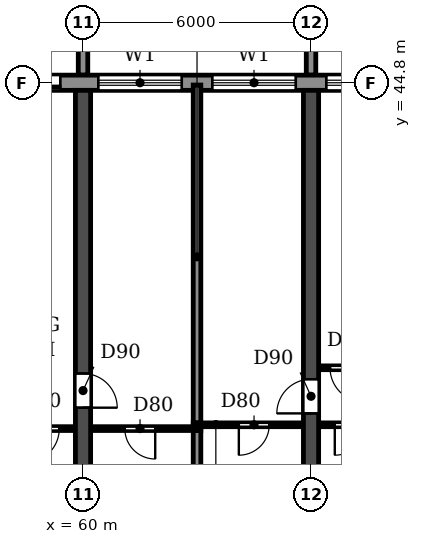
"""IFC4 building model, lengths in metres.
Left out: names, types, materials, properties, quantities, classifications, styles, units other than length and angle.
Written with IfcOpenShell. Run it as: python <this file> out.ifc"""

import sys

from ifc_helpers import new_model, si_unit, direction, frame, frame_2d, origin, place, context, subcontext, project, spatial, polyline, rectangle, outline, extrude, source, transform, mapped, element, fill, save


model = new_model("IFC4")
c1 = context("Model", 3, precision=1e-05, world=origin(), true_north=direction((0.0, 1.0)))
c2 = subcontext(c1, "Body", "Model", "MODEL_VIEW")
j1 = project(units=[si_unit("LENGTHUNIT", "METRE"), si_unit("PLANEANGLEUNIT", "RADIAN")], contexts=[c1])
p1 = place(None, origin())
s1 = spatial("IfcSite", under=j1, at=p1, CompositionType="ELEMENT")
p2 = place(p1, origin())
s2 = spatial("IfcBuilding", under=s1, at=p2, CompositionType="ELEMENT")
p3 = place(p2, frame((0.0, 0.0, 43.2)))
s3 = spatial("IfcBuildingStorey", under=s2, at=p3, CompositionType="ELEMENT", Elevation=43.2)
p4 = place(p3, frame((60.0, 30.55, 0.0), z_axis=(0.0, 0.0, 1.0), x_axis=(0.0, 1.0, 0.0)))
e1 = element("IfcWall", 1, at=p4, inside=s3, PredefinedType="SHEAR", context=c2, shape_type="SweptSolid", body=[
    extrude(rectangle(XDim=14.05, YDim=0.4, at=frame_2d((7.025, 0.0))), origin(), (0.0, 0.0, 1.0), 3.05),
])
p5 = place(p4, frame((5.7, 0.0, 0.0)))
e2 = element("IfcOpeningElement", 2, at=p5, cuts=e1, PredefinedType="OPENING", context=c2, shape_type="SweptSolid", body=[
    extrude(rectangle(XDim=0.9, YDim=2.1, at=frame_2d((0.45, 1.05))), frame((0.0, 0.21, 0.0), z_axis=(0.0, -1.0, 0.0), x_axis=(1.0, 0.0, 0.0)), (0.0, 0.0, 1.0), 0.42),
])
p6 = place(p3, frame((66.0, 30.55, 0.0), z_axis=(0.0, 0.0, 1.0), x_axis=(0.0, 1.0, 0.0)))
e3 = element("IfcWall", 3, at=p6, inside=s3, PredefinedType="SHEAR", context=c2, shape_type="SweptSolid", body=[
    extrude(rectangle(XDim=14.05, YDim=0.4, at=frame_2d((7.025, 0.0))), origin(), (0.0, 0.0, 1.0), 3.05),
])
p7 = place(p6, frame((5.55, 0.0, 0.0)))
e4 = element("IfcOpeningElement", 4, at=p7, cuts=e3, PredefinedType="OPENING", context=c2, shape_type="SweptSolid", body=[
    extrude(rectangle(XDim=0.9, YDim=2.1, at=frame_2d((0.45, 1.05))), frame((0.0, 0.21, 0.0), z_axis=(0.0, -1.0, 0.0), x_axis=(1.0, 0.0, 0.0)), (0.0, 0.0, 1.0), 0.42),
])
p8 = place(p3, frame((97.317, 44.8, 0.0), z_axis=(0.0, 0.0, 1.0), x_axis=(-1.0, 0.0, 0.0)))
e5 = element("IfcWall", 5, at=p8, inside=s3, PredefinedType="STANDARD", context=c2, shape_type="SweptSolid", body=[
    extrude(rectangle(XDim=92.634, YDim=0.4, at=frame_2d((46.317, 0.0))), origin(), (0.0, 0.0, 1.0), 3.05),
])
p9 = place(p8, frame((88.917, 0.0, 0.0)))
e6 = element("IfcOpeningElement", 6, at=p9, cuts=e5, PredefinedType="OPENING", context=c2, shape_type="SweptSolid", body=[
    extrude(rectangle(XDim=1.8, YDim=2.4, at=frame_2d((0.9, 1.2))), frame((0.0, 0.21, 0.0), z_axis=(0.0, -1.0, 0.0), x_axis=(1.0, 0.0, 0.0)), (0.0, 0.0, 1.0), 0.42),
])
p10 = place(p8, frame((85.717, 0.0, 0.9)))
e7 = element("IfcOpeningElement", 7, at=p10, cuts=e5, PredefinedType="OPENING", context=c2, shape_type="SweptSolid", body=[
    extrude(rectangle(XDim=2.2, YDim=1.5, at=frame_2d((1.1, 0.75))), frame((0.0, 0.21, 0.0), z_axis=(0.0, -1.0, 0.0), x_axis=(1.0, 0.0, 0.0)), (0.0, 0.0, 1.0), 0.42),
])
p11 = place(p8, frame((82.717, 0.0, 0.9)))
e8 = element("IfcOpeningElement", 8, at=p11, cuts=e5, PredefinedType="OPENING", context=c2, shape_type="SweptSolid", body=[
    extrude(rectangle(XDim=2.2, YDim=1.5, at=frame_2d((1.1, 0.75))), frame((0.0, 0.21, 0.0), z_axis=(0.0, -1.0, 0.0), x_axis=(1.0, 0.0, 0.0)), (0.0, 0.0, 1.0), 0.42),
])
p12 = place(p8, frame((79.717, 0.0, 0.9)))
e9 = element("IfcOpeningElement", 9, at=p12, cuts=e5, PredefinedType="OPENING", context=c2, shape_type="SweptSolid", body=[
    extrude(rectangle(XDim=2.2, YDim=1.5, at=frame_2d((1.1, 0.75))), frame((0.0, 0.21, 0.0), z_axis=(0.0, -1.0, 0.0), x_axis=(1.0, 0.0, 0.0)), (0.0, 0.0, 1.0), 0.42),
])
p13 = place(p8, frame((76.717, 0.0, 0.9)))
e10 = element("IfcOpeningElement", 10, at=p13, cuts=e5, PredefinedType="OPENING", context=c2, shape_type="SweptSolid", body=[
    extrude(rectangle(XDim=2.2, YDim=1.5, at=frame_2d((1.1, 0.75))), frame((0.0, 0.21, 0.0), z_axis=(0.0, -1.0, 0.0), x_axis=(1.0, 0.0, 0.0)), (0.0, 0.0, 1.0), 0.42),
])
p14 = place(p8, frame((73.917, 0.0, 0.0)))
e11 = element("IfcOpeningElement", 11, at=p14, cuts=e5, PredefinedType="OPENING", context=c2, shape_type="SweptSolid", body=[
    extrude(rectangle(XDim=1.8, YDim=2.4, at=frame_2d((0.9, 1.2))), frame((0.0, 0.21, 0.0), z_axis=(0.0, -1.0, 0.0), x_axis=(1.0, 0.0, 0.0)), (0.0, 0.0, 1.0), 0.42),
])
p15 = place(p8, frame((70.717, 0.0, 0.9)))
e12 = element("IfcOpeningElement", 12, at=p15, cuts=e5, PredefinedType="OPENING", context=c2, shape_type="SweptSolid", body=[
    extrude(rectangle(XDim=2.2, YDim=1.5, at=frame_2d((1.1, 0.75))), frame((0.0, 0.21, 0.0), z_axis=(0.0, -1.0, 0.0), x_axis=(1.0, 0.0, 0.0)), (0.0, 0.0, 1.0), 0.42),
])
p16 = place(p8, frame((67.717, 0.0, 0.9)))
e13 = element("IfcOpeningElement", 13, at=p16, cuts=e5, PredefinedType="OPENING", context=c2, shape_type="SweptSolid", body=[
    extrude(rectangle(XDim=2.2, YDim=1.5, at=frame_2d((1.1, 0.75))), frame((0.0, 0.21, 0.0), z_axis=(0.0, -1.0, 0.0), x_axis=(1.0, 0.0, 0.0)), (0.0, 0.0, 1.0), 0.42),
])
p17 = place(p8, frame((64.717, 0.0, 0.9)))
e14 = element("IfcOpeningElement", 14, at=p17, cuts=e5, PredefinedType="OPENING", context=c2, shape_type="SweptSolid", body=[
    extrude(rectangle(XDim=2.2, YDim=1.5, at=frame_2d((1.1, 0.75))), frame((0.0, 0.21, 0.0), z_axis=(0.0, -1.0, 0.0), x_axis=(1.0, 0.0, 0.0)), (0.0, 0.0, 1.0), 0.42),
])
p18 = place(p8, frame((61.917, 0.0, 0.0)))
e15 = element("IfcOpeningElement", 15, at=p18, cuts=e5, PredefinedType="OPENING", context=c2, shape_type="SweptSolid", body=[
    extrude(rectangle(XDim=1.8, YDim=2.4, at=frame_2d((0.9, 1.2))), frame((0.0, 0.21, 0.0), z_axis=(0.0, -1.0, 0.0), x_axis=(1.0, 0.0, 0.0)), (0.0, 0.0, 1.0), 0.42),
])
p19 = place(p8, frame((58.717, 0.0, 0.9)))
e16 = element("IfcOpeningElement", 16, at=p19, cuts=e5, PredefinedType="OPENING", context=c2, shape_type="SweptSolid", body=[
    extrude(rectangle(XDim=2.2, YDim=1.5, at=frame_2d((1.1, 0.75))), frame((0.0, 0.21, 0.0), z_axis=(0.0, -1.0, 0.0), x_axis=(1.0, 0.0, 0.0)), (0.0, 0.0, 1.0), 0.42),
])
p20 = place(p8, frame((55.717, 0.0, 0.9)))
e17 = element("IfcOpeningElement", 17, at=p20, cuts=e5, PredefinedType="OPENING", context=c2, shape_type="SweptSolid", body=[
    extrude(rectangle(XDim=2.2, YDim=1.5, at=frame_2d((1.1, 0.75))), frame((0.0, 0.21, 0.0), z_axis=(0.0, -1.0, 0.0), x_axis=(1.0, 0.0, 0.0)), (0.0, 0.0, 1.0), 0.42),
])
p21 = place(p8, frame((52.717, 0.0, 0.9)))
e18 = element("IfcOpeningElement", 18, at=p21, cuts=e5, PredefinedType="OPENING", context=c2, shape_type="SweptSolid", body=[
    extrude(rectangle(XDim=2.2, YDim=1.5, at=frame_2d((1.1, 0.75))), frame((0.0, 0.21, 0.0), z_axis=(0.0, -1.0, 0.0), x_axis=(1.0, 0.0, 0.0)), (0.0, 0.0, 1.0), 0.42),
])
p22 = place(p8, frame((49.917, 0.0, 0.0)))
e19 = element("IfcOpeningElement", 19, at=p22, cuts=e5, PredefinedType="OPENING", context=c2, shape_type="SweptSolid", body=[
    extrude(rectangle(XDim=1.8, YDim=2.4, at=frame_2d((0.9, 1.2))), frame((0.0, 0.21, 0.0), z_axis=(0.0, -1.0, 0.0), x_axis=(1.0, 0.0, 0.0)), (0.0, 0.0, 1.0), 0.42),
])
p23 = place(p8, frame((46.717, 0.0, 0.9)))
e20 = element("IfcOpeningElement", 20, at=p23, cuts=e5, PredefinedType="OPENING", context=c2, shape_type="SweptSolid", body=[
    extrude(rectangle(XDim=2.2, YDim=1.5, at=frame_2d((1.1, 0.75))), frame((0.0, 0.21, 0.0), z_axis=(0.0, -1.0, 0.0), x_axis=(1.0, 0.0, 0.0)), (0.0, 0.0, 1.0), 0.42),
])
p24 = place(p8, frame((43.717, 0.0, 0.9)))
e21 = element("IfcOpeningElement", 21, at=p24, cuts=e5, PredefinedType="OPENING", context=c2, shape_type="SweptSolid", body=[
    extrude(rectangle(XDim=2.2, YDim=1.5, at=frame_2d((1.1, 0.75))), frame((0.0, 0.21, 0.0), z_axis=(0.0, -1.0, 0.0), x_axis=(1.0, 0.0, 0.0)), (0.0, 0.0, 1.0), 0.42),
])
p25 = place(p8, frame((40.717, 0.0, 0.9)))
e22 = element("IfcOpeningElement", 22, at=p25, cuts=e5, PredefinedType="OPENING", context=c2, shape_type="SweptSolid", body=[
    extrude(rectangle(XDim=2.2, YDim=1.5, at=frame_2d((1.1, 0.75))), frame((0.0, 0.21, 0.0), z_axis=(0.0, -1.0, 0.0), x_axis=(1.0, 0.0, 0.0)), (0.0, 0.0, 1.0), 0.42),
])
p26 = place(p8, frame((37.917, 0.0, 0.0)))
e23 = element("IfcOpeningElement", 23, at=p26, cuts=e5, PredefinedType="OPENING", context=c2, shape_type="SweptSolid", body=[
    extrude(rectangle(XDim=1.8, YDim=2.4, at=frame_2d((0.9, 1.2))), frame((0.0, 0.21, 0.0), z_axis=(0.0, -1.0, 0.0), x_axis=(1.0, 0.0, 0.0)), (0.0, 0.0, 1.0), 0.42),
])
p27 = place(p8, frame((34.717, 0.0, 0.9)))
e24 = element("IfcOpeningElement", 24, at=p27, cuts=e5, PredefinedType="OPENING", context=c2, shape_type="SweptSolid", body=[
    extrude(rectangle(XDim=2.2, YDim=1.5, at=frame_2d((1.1, 0.75))), frame((0.0, 0.21, 0.0), z_axis=(0.0, -1.0, 0.0), x_axis=(1.0, 0.0, 0.0)), (0.0, 0.0, 1.0), 0.42),
])
p28 = place(p8, frame((31.717, 0.0, 0.9)))
e25 = element("IfcOpeningElement", 25, at=p28, cuts=e5, PredefinedType="OPENING", context=c2, shape_type="SweptSolid", body=[
    extrude(rectangle(XDim=2.2, YDim=1.5, at=frame_2d((1.1, 0.75))), frame((0.0, 0.21, 0.0), z_axis=(0.0, -1.0, 0.0), x_axis=(1.0, 0.0, 0.0)), (0.0, 0.0, 1.0), 0.42),
])
p29 = place(p8, frame((28.717, 0.0, 0.9)))
e26 = element("IfcOpeningElement", 26, at=p29, cuts=e5, PredefinedType="OPENING", context=c2, shape_type="SweptSolid", body=[
    extrude(rectangle(XDim=2.2, YDim=1.5, at=frame_2d((1.1, 0.75))), frame((0.0, 0.21, 0.0), z_axis=(0.0, -1.0, 0.0), x_axis=(1.0, 0.0, 0.0)), (0.0, 0.0, 1.0), 0.42),
])
p30 = place(p8, frame((25.917, 0.0, 0.0)))
e27 = element("IfcOpeningElement", 27, at=p30, cuts=e5, PredefinedType="OPENING", context=c2, shape_type="SweptSolid", body=[
    extrude(rectangle(XDim=1.8, YDim=2.4, at=frame_2d((0.9, 1.2))), frame((0.0, 0.21, 0.0), z_axis=(0.0, -1.0, 0.0), x_axis=(1.0, 0.0, 0.0)), (0.0, 0.0, 1.0), 0.42),
])
p31 = place(p8, frame((22.917, 0.0, 0.0)))
e28 = element("IfcOpeningElement", 28, at=p31, cuts=e5, PredefinedType="OPENING", context=c2, shape_type="SweptSolid", body=[
    extrude(rectangle(XDim=1.8, YDim=2.4, at=frame_2d((0.9, 1.2))), frame((0.0, 0.21, 0.0), z_axis=(0.0, -1.0, 0.0), x_axis=(1.0, 0.0, 0.0)), (0.0, 0.0, 1.0), 0.42),
])
p32 = place(p8, frame((19.717, 0.0, 0.9)))
e29 = element("IfcOpeningElement", 29, at=p32, cuts=e5, PredefinedType="OPENING", context=c2, shape_type="SweptSolid", body=[
    extrude(rectangle(XDim=2.2, YDim=1.5, at=frame_2d((1.1, 0.75))), frame((0.0, 0.21, 0.0), z_axis=(0.0, -1.0, 0.0), x_axis=(1.0, 0.0, 0.0)), (0.0, 0.0, 1.0), 0.42),
])
p33 = place(p8, frame((16.717, 0.0, 0.9)))
e30 = element("IfcOpeningElement", 30, at=p33, cuts=e5, PredefinedType="OPENING", context=c2, shape_type="SweptSolid", body=[
    extrude(rectangle(XDim=2.2, YDim=1.5, at=frame_2d((1.1, 0.75))), frame((0.0, 0.21, 0.0), z_axis=(0.0, -1.0, 0.0), x_axis=(1.0, 0.0, 0.0)), (0.0, 0.0, 1.0), 0.42),
])
p34 = place(p8, frame((13.717, 0.0, 0.9)))
e31 = element("IfcOpeningElement", 31, at=p34, cuts=e5, PredefinedType="OPENING", context=c2, shape_type="SweptSolid", body=[
    extrude(rectangle(XDim=2.2, YDim=1.5, at=frame_2d((1.1, 0.75))), frame((0.0, 0.21, 0.0), z_axis=(0.0, -1.0, 0.0), x_axis=(1.0, 0.0, 0.0)), (0.0, 0.0, 1.0), 0.42),
])
p35 = place(p8, frame((10.717, 0.0, 0.9)))
e32 = element("IfcOpeningElement", 32, at=p35, cuts=e5, PredefinedType="OPENING", context=c2, shape_type="SweptSolid", body=[
    extrude(rectangle(XDim=2.2, YDim=1.5, at=frame_2d((1.1, 0.75))), frame((0.0, 0.21, 0.0), z_axis=(0.0, -1.0, 0.0), x_axis=(1.0, 0.0, 0.0)), (0.0, 0.0, 1.0), 0.42),
])
p36 = place(p8, frame((7.917, 0.0, 0.0)))
e33 = element("IfcOpeningElement", 33, at=p36, cuts=e5, PredefinedType="OPENING", context=c2, shape_type="SweptSolid", body=[
    extrude(rectangle(XDim=1.8, YDim=2.4, at=frame_2d((0.9, 1.2))), frame((0.0, 0.21, 0.0), z_axis=(0.0, -1.0, 0.0), x_axis=(1.0, 0.0, 0.0)), (0.0, 0.0, 1.0), 0.42),
])
p37 = place(p8, frame((4.717, 0.0, 0.9)))
e34 = element("IfcOpeningElement", 34, at=p37, cuts=e5, PredefinedType="OPENING", context=c2, shape_type="SweptSolid", body=[
    extrude(rectangle(XDim=2.2, YDim=1.5, at=frame_2d((1.1, 0.75))), frame((0.0, 0.21, 0.0), z_axis=(0.0, -1.0, 0.0), x_axis=(1.0, 0.0, 0.0)), (0.0, 0.0, 1.0), 0.42),
])
p38 = place(p8, frame((1.917, 0.0, 0.0)))
e35 = element("IfcOpeningElement", 35, at=p38, cuts=e5, PredefinedType="OPENING", context=c2, shape_type="SweptSolid", body=[
    extrude(rectangle(XDim=1.8, YDim=2.4, at=frame_2d((0.9, 1.2))), frame((0.0, 0.21, 0.0), z_axis=(0.0, -1.0, 0.0), x_axis=(1.0, 0.0, 0.0)), (0.0, 0.0, 1.0), 0.42),
])
m1 = source(origin(), c2, "Body", "SweptSolid", [
    extrude(outline(polyline([(0.0, 0.0), (0.25, 0.0), (0.25, 3.1), (0.0, 3.1), (0.0, 0.0)])), origin(), (0.0, 0.0, 1.0), 3.1),
])
for number, where in (
    (36, (59.875, 45.0, 0.0)),
    (37, (65.875, 45.0, 0.0)),
):
    element("IfcWall", number, at=place(p3, frame(where)), inside=s3, PredefinedType="STANDARD", context=c2, shape_type="MappedRepresentation", body=[
        mapped(m1, transform((0.0, 0.0, 0.0))),
    ])
p39 = place(p3, frame((63.0, 30.56, 0.0), z_axis=(0.0, 0.0, 1.0), x_axis=(0.0, 1.0, 0.0)))
e38 = element("IfcWall", 38, at=p39, inside=s3, PredefinedType="PARTITIONING", context=c2, shape_type="SweptSolid", body=[
    extrude(rectangle(XDim=5.09, YDim=0.2, at=frame_2d((2.545, 0.0))), origin(), (0.0, 0.0, 1.0), 3.05),
])
p40 = place(p3, frame((63.0, 35.85, 0.0), z_axis=(0.0, 0.0, 1.0), x_axis=(0.0, 1.0, 0.0)))
e39 = element("IfcWall", 39, at=p40, inside=s3, PredefinedType="PARTITIONING", context=c2, shape_type="SweptSolid", body=[
    extrude(rectangle(XDim=8.89, YDim=0.2, at=frame_2d((4.445, 0.0))), origin(), (0.0, 0.0, 1.0), 3.05),
])
p41 = place(p3, frame((57.8, 35.7, 0.0), z_axis=(0.0, 0.0, 1.0), x_axis=(1.0, 0.0, 0.0)))
e40 = element("IfcWall", 40, at=p41, inside=s3, PredefinedType="PARTITIONING", context=c2, shape_type="SweptSolid", body=[
    extrude(rectangle(XDim=1.99, YDim=0.1, at=frame_2d((0.995, 0.0))), origin(), (0.0, 0.0, 1.0), 3.05),
])
p42 = place(p41, frame((0.675, 0.0, 0.0)))
e41 = element("IfcOpeningElement", 41, at=p42, cuts=e40, PredefinedType="OPENING", context=c2, shape_type="SweptSolid", body=[
    extrude(rectangle(XDim=0.9, YDim=2.1, at=frame_2d((0.45, 1.05))), frame((0.0, 0.06, 0.0), z_axis=(0.0, -1.0, 0.0), x_axis=(1.0, 0.0, 0.0)), (0.0, 0.0, 1.0), 0.12),
])
p43 = place(p3, frame((60.21, 35.7, 0.0), z_axis=(0.0, 0.0, 1.0), x_axis=(1.0, 0.0, 0.0)))
e42 = element("IfcWall", 42, at=p43, inside=s3, PredefinedType="PARTITIONING", context=c2, shape_type="SweptSolid", body=[
    extrude(rectangle(XDim=2.89, YDim=0.1, at=frame_2d((1.445, 0.0))), origin(), (0.0, 0.0, 1.0), 3.05),
])
p44 = place(p43, frame((0.89, 0.0, 0.0)))
e43 = element("IfcOpeningElement", 43, at=p44, cuts=e42, PredefinedType="OPENING", context=c2, shape_type="SweptSolid", body=[
    extrude(rectangle(XDim=0.8, YDim=2.1, at=frame_2d((0.4, 1.05))), frame((0.0, 0.06, 0.0), z_axis=(0.0, -1.0, 0.0), x_axis=(1.0, 0.0, 0.0)), (0.0, 0.0, 1.0), 0.12),
])
p45 = place(p3, frame((62.9, 35.8, 0.0), z_axis=(0.0, 0.0, 1.0), x_axis=(1.0, 0.0, 0.0)))
e44 = element("IfcWall", 44, at=p45, inside=s3, PredefinedType="PARTITIONING", context=c2, shape_type="SweptSolid", body=[
    extrude(rectangle(XDim=2.89, YDim=0.1, at=frame_2d((1.445, 0.0))), origin(), (0.0, 0.0, 1.0), 3.05),
])
p46 = place(p45, frame((1.2, 0.0, 0.0)))
e45 = element("IfcOpeningElement", 45, at=p46, cuts=e44, PredefinedType="OPENING", context=c2, shape_type="SweptSolid", body=[
    extrude(rectangle(XDim=0.8, YDim=2.1, at=frame_2d((0.4, 1.05))), frame((0.0, 0.06, 0.0), z_axis=(0.0, -1.0, 0.0), x_axis=(1.0, 0.0, 0.0)), (0.0, 0.0, 1.0), 0.12),
])
p47 = place(p3, frame((66.21, 35.8, 0.0), z_axis=(0.0, 0.0, 1.0), x_axis=(1.0, 0.0, 0.0)))
e46 = element("IfcWall", 46, at=p47, inside=s3, PredefinedType="PARTITIONING", context=c2, shape_type="SweptSolid", body=[
    extrude(rectangle(XDim=1.89, YDim=0.1, at=frame_2d((0.945, 0.0))), origin(), (0.0, 0.0, 1.0), 3.05),
])
p48 = place(p47, frame((0.415, 0.0, 0.0)))
e47 = element("IfcOpeningElement", 47, at=p48, cuts=e46, PredefinedType="OPENING", context=c2, shape_type="SweptSolid", body=[
    extrude(rectangle(XDim=0.8, YDim=2.1, at=frame_2d((0.4, 1.05))), frame((0.0, 0.06, 0.0), z_axis=(0.0, -1.0, 0.0), x_axis=(1.0, 0.0, 0.0)), (0.0, 0.0, 1.0), 0.12),
])
p49 = place(p3, frame((66.21, 37.3, 0.0), z_axis=(0.0, 0.0, 1.0), x_axis=(1.0, 0.0, 0.0)))
e48 = element("IfcWall", 48, at=p49, inside=s3, PredefinedType="PARTITIONING", context=c2, shape_type="SweptSolid", body=[
    extrude(rectangle(XDim=2.84, YDim=0.1, at=frame_2d((1.42, 0.0))), origin(), (0.0, 0.0, 1.0), 3.05),
])
p50 = place(p49, frame((0.29, 0.0, 0.0)))
e49 = element("IfcOpeningElement", 49, at=p50, cuts=e48, PredefinedType="OPENING", context=c2, shape_type="SweptSolid", body=[
    extrude(rectangle(XDim=0.9, YDim=2.1, at=frame_2d((0.45, 1.05))), frame((0.0, 0.06, 0.0), z_axis=(0.0, -1.0, 0.0), x_axis=(1.0, 0.0, 0.0)), (0.0, 0.0, 1.0), 0.12),
])
p51 = place(p26, origin())
e50 = element("IfcDoor", 50, at=p51, inside=s3, OperationType="DOUBLE_DOOR_SLIDING", PredefinedType="DOOR", context=c2, shape_type="SweptSolid", body=[
    extrude(rectangle(XDim=1.8, YDim=2.4, at=frame_2d((0.9, 1.2))), frame((0.0, 0.025, 0.0), z_axis=(0.0, -1.0, 0.0), x_axis=(1.0, 0.0, 0.0)), (0.0, 0.0, 1.0), 0.05),
])
fill(e23, e50)
p52 = place(p27, origin())
e51 = element("IfcWindow", 51, at=p52, inside=s3, PartitioningType="DOUBLE_PANEL_HORIZONTAL", PredefinedType="WINDOW", context=c2, shape_type="SweptSolid", body=[
    extrude(rectangle(XDim=2.2, YDim=1.5, at=frame_2d((1.1, 0.75))), frame((0.0, 0.03, 0.0), z_axis=(0.0, -1.0, 0.0), x_axis=(1.0, 0.0, 0.0)), (0.0, 0.0, 1.0), 0.06),
])
fill(e24, e51)
p53 = place(p28, origin())
e52 = element("IfcWindow", 52, at=p53, inside=s3, PartitioningType="DOUBLE_PANEL_HORIZONTAL", PredefinedType="WINDOW", context=c2, shape_type="SweptSolid", body=[
    extrude(rectangle(XDim=2.2, YDim=1.5, at=frame_2d((1.1, 0.75))), frame((0.0, 0.03, 0.0), z_axis=(0.0, -1.0, 0.0), x_axis=(1.0, 0.0, 0.0)), (0.0, 0.0, 1.0), 0.06),
])
fill(e25, e52)
p54 = place(p29, origin())
e53 = element("IfcWindow", 53, at=p54, inside=s3, PartitioningType="DOUBLE_PANEL_HORIZONTAL", PredefinedType="WINDOW", context=c2, shape_type="SweptSolid", body=[
    extrude(rectangle(XDim=2.2, YDim=1.5, at=frame_2d((1.1, 0.75))), frame((0.0, 0.03, 0.0), z_axis=(0.0, -1.0, 0.0), x_axis=(1.0, 0.0, 0.0)), (0.0, 0.0, 1.0), 0.06),
])
fill(e26, e53)
p55 = place(p44, frame((0.8, 0.0, 0.0), z_axis=(0.0, 0.0, 1.0), x_axis=(-1.0, 0.0, 0.0)))
e54 = element("IfcDoor", 54, at=p55, inside=s3, OperationType="SINGLE_SWING_LEFT", PredefinedType="DOOR", context=c2, shape_type="SweptSolid", body=[
    extrude(rectangle(XDim=0.8, YDim=2.1, at=frame_2d((0.4, 1.05))), frame((0.0, 0.025, 0.0), z_axis=(0.0, -1.0, 0.0), x_axis=(1.0, 0.0, 0.0)), (0.0, 0.0, 1.0), 0.05),
])
fill(e43, e54)
p56 = place(p42, frame((0.9, 0.0, 0.0), z_axis=(0.0, 0.0, 1.0), x_axis=(-1.0, 0.0, 0.0)))
e55 = element("IfcDoor", 55, at=p56, inside=s3, OperationType="SINGLE_SWING_RIGHT", PredefinedType="DOOR", context=c2, shape_type="SweptSolid", body=[
    extrude(rectangle(XDim=0.9, YDim=2.1, at=frame_2d((0.45, 1.05))), frame((0.0, 0.025, 0.0), z_axis=(0.0, -1.0, 0.0), x_axis=(1.0, 0.0, 0.0)), (0.0, 0.0, 1.0), 0.05),
])
fill(e41, e55)
p57 = place(p5, frame((0.9, 0.0, 0.0), z_axis=(0.0, 0.0, 1.0), x_axis=(-1.0, 0.0, 0.0)))
e56 = element("IfcDoor", 56, at=p57, inside=s3, OperationType="SINGLE_SWING_RIGHT", PredefinedType="DOOR", context=c2, shape_type="SweptSolid", body=[
    extrude(rectangle(XDim=0.9, YDim=2.1, at=frame_2d((0.45, 1.05))), frame((0.0, 0.025, 0.0), z_axis=(0.0, -1.0, 0.0), x_axis=(1.0, 0.0, 0.0)), (0.0, 0.0, 1.0), 0.05),
])
fill(e2, e56)
p58 = place(p46, frame((0.8, 0.0, 0.0), z_axis=(0.0, 0.0, 1.0), x_axis=(-1.0, 0.0, 0.0)))
e57 = element("IfcDoor", 57, at=p58, inside=s3, OperationType="SINGLE_SWING_RIGHT", PredefinedType="DOOR", context=c2, shape_type="SweptSolid", body=[
    extrude(rectangle(XDim=0.8, YDim=2.1, at=frame_2d((0.4, 1.05))), frame((0.0, 0.025, 0.0), z_axis=(0.0, -1.0, 0.0), x_axis=(1.0, 0.0, 0.0)), (0.0, 0.0, 1.0), 0.05),
])
fill(e45, e57)
p59 = place(p7, origin())
e58 = element("IfcDoor", 58, at=p59, inside=s3, OperationType="SINGLE_SWING_LEFT", PredefinedType="DOOR", context=c2, shape_type="SweptSolid", body=[
    extrude(rectangle(XDim=0.9, YDim=2.1, at=frame_2d((0.45, 1.05))), frame((0.0, 0.025, 0.0), z_axis=(0.0, -1.0, 0.0), x_axis=(1.0, 0.0, 0.0)), (0.0, 0.0, 1.0), 0.05),
])
fill(e4, e58)
p60 = place(p50, frame((0.9, 0.0, 0.0), z_axis=(0.0, 0.0, 1.0), x_axis=(-1.0, 0.0, 0.0)))
e59 = element("IfcDoor", 59, at=p60, inside=s3, OperationType="SINGLE_SWING_LEFT", PredefinedType="DOOR", context=c2, shape_type="SweptSolid", body=[
    extrude(rectangle(XDim=0.9, YDim=2.1, at=frame_2d((0.45, 1.05))), frame((0.0, 0.025, 0.0), z_axis=(0.0, -1.0, 0.0), x_axis=(1.0, 0.0, 0.0)), (0.0, 0.0, 1.0), 0.05),
])
fill(e49, e59)
p61 = place(p48, frame((0.8, 0.0, 0.0), z_axis=(0.0, 0.0, 1.0), x_axis=(-1.0, 0.0, 0.0)))
e60 = element("IfcDoor", 60, at=p61, inside=s3, OperationType="SINGLE_SWING_RIGHT", PredefinedType="DOOR", context=c2, shape_type="SweptSolid", body=[
    extrude(rectangle(XDim=0.8, YDim=2.1, at=frame_2d((0.4, 1.05))), frame((0.0, 0.025, 0.0), z_axis=(0.0, -1.0, 0.0), x_axis=(1.0, 0.0, 0.0)), (0.0, 0.0, 1.0), 0.05),
])
fill(e47, e60)
save(model, sys.argv[1])
